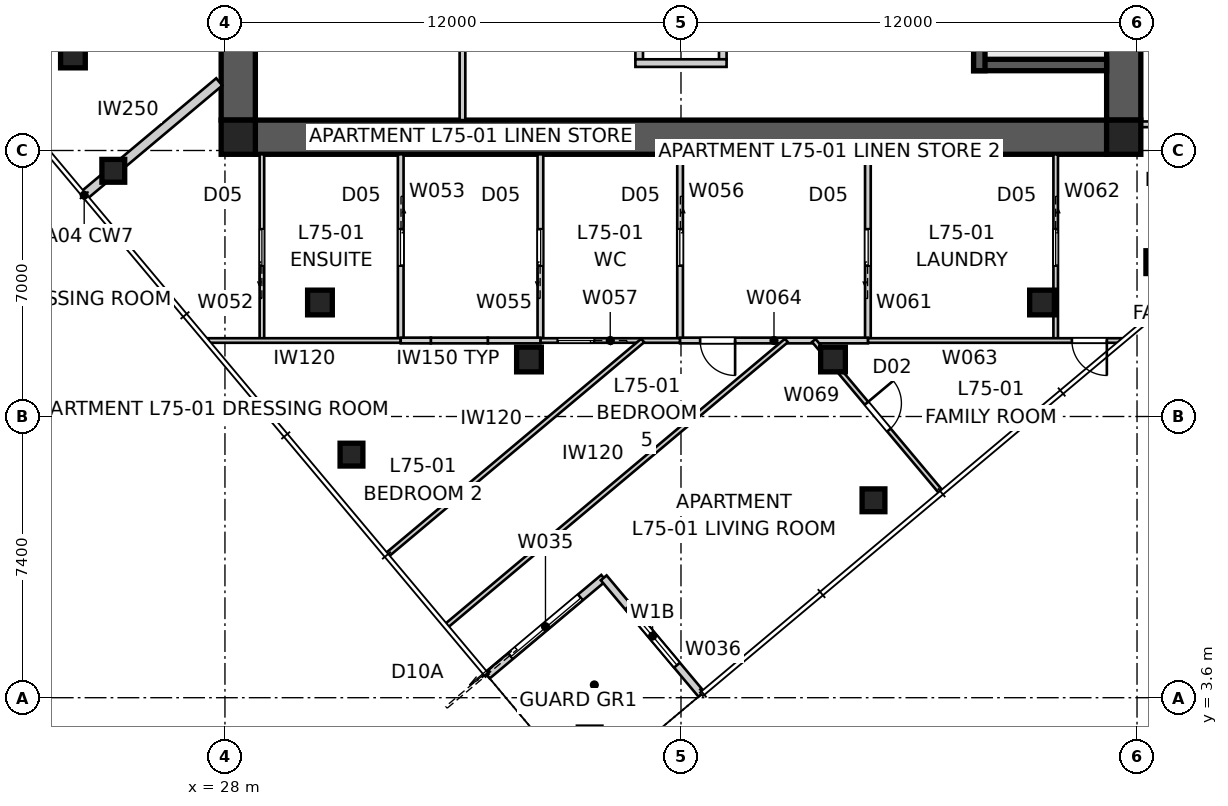
"""IFC4 building model, lengths in metres.
Left out: names, types, materials, properties, quantities, classifications, styles, units other than length and angle.
Written with IfcOpenShell. Run it as: python <this file> out.ifc"""

import sys

from ifc_helpers import new_model, si_unit, direction, frame, frame_2d, origin, origin_2d, place, context, subcontext, project, spatial, polyline, rectangle, outline, extrude, element, fill, save


model = new_model("IFC4")
c1 = context("Model", 3, precision=1e-05, world=origin(), true_north=direction((0.0, 1.0)))
c2 = subcontext(c1, "Body", "Model", "MODEL_VIEW")
j1 = project(units=[si_unit("LENGTHUNIT", "METRE"), si_unit("PLANEANGLEUNIT", "RADIAN")], contexts=[c1])
p1 = place(None, origin())
s1 = spatial("IfcSite", under=j1, at=p1, CompositionType="ELEMENT")
p2 = place(p1, origin())
s2 = spatial("IfcBuilding", under=s1, at=p2, CompositionType="ELEMENT")
p3 = place(p2, frame((0.0, 0.0, 272.6)))
s3 = spatial("IfcBuildingStorey", under=s2, at=p3, CompositionType="ELEMENT", Elevation=272.6)
p4 = place(p3, frame((51.2, 18.35, 0.0), z_axis=(0.0, 0.0, 1.0), x_axis=(-1.0, 0.0, 0.0)))
e1 = element("IfcWall", 1, at=p4, inside=s3, PredefinedType="SHEAR", context=c2, shape_type="SweptSolid", body=[
    extrude(outline(polyline([(0.0, -0.45), (22.4, -0.45), (22.4, -0.025), (22.85, -0.025), (22.85, 0.025), (22.4, 0.025), (22.4, 0.45), (0.0, 0.45), (0.0, 0.025), (-0.45, 0.025), (-0.45, -0.025), (0.0, -0.025), (0.0, -0.45)])), origin(), (0.0, 0.0, 1.0), 3.4),
])
p5 = place(p3, frame((51.65, 18.8, 0.0), z_axis=(0.0, 0.0, 1.0), x_axis=(0.0, 1.0, 0.0)))
e2 = element("IfcWall", 2, at=p5, inside=s3, PredefinedType="SHEAR", context=c2, shape_type="SweptSolid", body=[
    extrude(outline(polyline([(0.0, -0.45), (22.4, -0.45), (22.4, -0.025), (22.85, -0.025), (22.85, 0.025), (22.4, 0.025), (22.4, 0.45), (0.0, 0.45), (0.0, 0.025), (-0.45, 0.025), (-0.45, -0.025), (0.0, -0.025), (0.0, -0.45)])), origin(), (0.0, 0.0, 1.0), 3.4),
])
p6 = place(p5, frame((11.14, 0.0, 0.0)))
e3 = element("IfcOpeningElement", 3, at=p6, cuts=e2, PredefinedType="OPENING", context=c2, shape_type="SweptSolid", body=[
    extrude(rectangle(XDim=1.02, YDim=2.4, at=frame_2d((0.51, 1.2))), frame((0.0, 0.46, 0.0), z_axis=(0.0, -1.0, 0.0), x_axis=(1.0, 0.0, 0.0)), (0.0, 0.0, 1.0), 0.92),
])
p7 = place(p3, frame((28.35, 41.2, 0.0), z_axis=(0.0, 0.0, 1.0), x_axis=(0.0, -1.0, 0.0)))
e4 = element("IfcWall", 4, at=p7, inside=s3, PredefinedType="SHEAR", context=c2, shape_type="SweptSolid", body=[
    extrude(outline(polyline([(0.0, -0.45), (22.4, -0.45), (22.4, -0.025), (22.85, -0.025), (22.85, 0.025), (22.4, 0.025), (22.4, 0.45), (0.0, 0.45), (0.0, 0.025), (-0.45, 0.025), (-0.45, -0.025), (0.0, -0.025), (0.0, -0.45)])), origin(), (0.0, 0.0, 1.0), 3.4),
])
p8 = place(p7, frame((11.14, 0.0, 0.0)))
e5 = element("IfcOpeningElement", 5, at=p8, cuts=e4, PredefinedType="OPENING", context=c2, shape_type="SweptSolid", body=[
    extrude(rectangle(XDim=1.02, YDim=2.4, at=frame_2d((0.51, 1.2))), frame((0.0, 0.46, 0.0), z_axis=(0.0, -1.0, 0.0), x_axis=(1.0, 0.0, 0.0)), (0.0, 0.0, 1.0), 0.92),
])
p9 = place(p3, frame((47.85, 27.8, 0.0), z_axis=(0.0, 0.0, 1.0), x_axis=(0.0, -1.0, 0.0)))
e6 = element("IfcWall", 6, at=p9, inside=s3, PredefinedType="SHEAR", context=c2, shape_type="SweptSolid", body=[
    extrude(rectangle(XDim=7.7, YDim=0.3, at=frame_2d((3.85, 0.0))), origin(), (0.0, 0.0, 1.0), 3.4),
])
p10 = place(p3, frame((51.2, 20.25, 0.0), z_axis=(0.0, 0.0, 1.0), x_axis=(-1.0, 0.0, 0.0)))
e7 = element("IfcWall", 7, at=p10, inside=s3, PredefinedType="SHEAR", context=c2, shape_type="SweptSolid", body=[
    extrude(rectangle(XDim=3.5, YDim=0.3, at=frame_2d((1.75, 0.0))), origin(), (0.0, 0.0, 1.0), 3.4),
])
for number, where, z_axis, x_axis in (
    (8, (38.9, 22.4, 0.0), (0.0, 0.0, 1.0), (0.0, -1.0, 0.0)),
    (9, (41.1, 22.4, 0.0), (0.0, 0.0, 1.0), (0.0, -1.0, 0.0)),
):
    element("IfcWall", number, at=place(p3, frame(where, z_axis=z_axis, x_axis=x_axis)), inside=s3, PredefinedType="SOLIDWALL", context=c2, shape_type="SweptSolid", body=[
        extrude(rectangle(XDim=2.0, YDim=0.2, at=frame_2d((1.0, 0.0))), origin(), (0.0, 0.0, 1.0), 3.4),
    ])
p11 = place(p3, frame((38.8, 20.3, 0.0), z_axis=(0.0, 0.0, 1.0), x_axis=(1.0, 0.0, 0.0)))
e10 = element("IfcWall", 10, at=p11, inside=s3, PredefinedType="SOLIDWALL", context=c2, shape_type="SweptSolid", body=[
    extrude(rectangle(XDim=2.4, YDim=0.2, at=frame_2d((1.2, 0.0))), origin(), (0.0, 0.0, 1.0), 3.4),
])
for number, where, z_axis, x_axis in (
    (11, (28.35, 18.35, 0.0), (0.0, 0.0, 1.0), (1.0, 0.0, 0.0)),
    (12, (51.65, 18.35, 0.0), (0.0, 0.0, 1.0), (1.0, 0.0, 0.0)),
):
    element("IfcColumn", number, at=place(p3, frame(where, z_axis=z_axis, x_axis=x_axis)), inside=s3, PredefinedType="COLUMN", context=c2, shape_type="SweptSolid", body=[
        extrude(rectangle(XDim=0.9, YDim=0.9, at=origin_2d()), origin(), (0.0, 0.0, 1.0), 3.4),
    ])
for number, where, z_axis, x_axis in (
    (13, (45.065, 8.795, -0.15), (0.0, 0.0, 1.0), (1.0, 0.0, 0.0)),
    (14, (52.534, 15.062, -0.15), (0.0, 0.0, 1.0), (1.0, 0.0, 0.0)),
    (15, (25.062, 17.466, -0.15), (0.0, 0.0, 1.0), (1.0, 0.0, 0.0)),
    (16, (31.329, 9.997, -0.15), (0.0, 0.0, 1.0), (1.0, 0.0, 0.0)),
):
    element("IfcColumn", number, at=place(p3, frame(where, z_axis=z_axis, x_axis=x_axis)), inside=s3, PredefinedType="COLUMN", context=c2, shape_type="SweptSolid", body=[
        extrude(rectangle(XDim=0.6, YDim=0.6, at=origin_2d()), origin(), (0.0, 0.0, 1.0), 3.55),
    ])
for number, where, z_axis, x_axis in (
    (17, (24.0, 20.5, 0.0), (0.0, 0.0, 1.0), (1.0, 0.0, 0.0)),
    (18, (30.5, 14.0, 0.0), (0.0, 0.0, 1.0), (1.0, 0.0, 0.0)),
    (19, (36.0, 12.5, 0.0), (0.0, 0.0, 1.0), (1.0, 0.0, 0.0)),
    (20, (44.0, 12.5, 0.0), (0.0, 0.0, 1.0), (1.0, 0.0, 0.0)),
    (21, (49.5, 14.0, 0.0), (0.0, 0.0, 1.0), (1.0, 0.0, 0.0)),
):
    element("IfcColumn", number, at=place(p3, frame(where, z_axis=z_axis, x_axis=x_axis)), inside=s3, PredefinedType="COLUMN", context=c2, shape_type="SweptSolid", body=[
        extrude(rectangle(XDim=0.65, YDim=0.65, at=origin_2d()), origin(), (0.0, 0.0, 1.0), 3.4),
    ])
p12 = place(p3, frame((34.902, 4.183, 0.0), z_axis=(0.0, 0.0, 1.0), x_axis=(0.766060656284, 0.642768287094, 0.0)))
e22 = element("IfcWall", 22, at=p12, inside=s3, PredefinedType="SOLIDWALL", context=c2, shape_type="SweptSolid", body=[
    extrude(rectangle(XDim=4.0, YDim=0.2, at=frame_2d((2.0, 0.0))), origin(), (0.0, 0.0, 1.0), 3.25),
])
p13 = place(p12, frame((0.8, 0.0, 0.0)))
e23 = element("IfcOpeningElement", 23, at=p13, cuts=e22, PredefinedType="OPENING", context=c2, shape_type="SweptSolid", body=[
    extrude(rectangle(XDim=2.4, YDim=2.1, at=frame_2d((1.2, 1.05))), frame((0.0, 0.11, 0.0), z_axis=(0.0, -1.0, 0.0), x_axis=(1.0, 0.0, 0.0)), (0.0, 0.0, 1.0), 0.22),
])
p14 = place(p3, frame((37.966, 6.754, 0.0), z_axis=(0.0, 0.0, 1.0), x_axis=(0.642798342015, -0.766035437498, 0.0)))
e24 = element("IfcWall", 24, at=p14, inside=s3, PredefinedType="SOLIDWALL", context=c2, shape_type="SweptSolid", body=[
    extrude(rectangle(XDim=4.0, YDim=0.2, at=frame_2d((2.0, 0.0))), origin(), (0.0, 0.0, 1.0), 3.25),
])
p15 = place(p14, frame((1.0, 0.0, 0.45)))
e25 = element("IfcOpeningElement", 25, at=p15, cuts=e24, PredefinedType="OPENING", context=c2, shape_type="SweptSolid", body=[
    extrude(rectangle(XDim=2.0, YDim=1.8, at=frame_2d((1.0, 0.9))), frame((0.0, 0.11, 0.0), z_axis=(0.0, -1.0, 0.0), x_axis=(1.0, 0.0, 0.0)), (0.0, 0.0, 1.0), 0.22),
])
p16 = place(p3, frame((24.296, 16.823, 0.0), z_axis=(0.0, 0.0, 1.0), x_axis=(0.76603440109, 0.64279957712, 0.0)))
e26 = element("IfcWall", 26, at=p16, inside=s3, PredefinedType="PARTITIONING", context=c2, shape_type="SweptSolid", body=[
    extrude(rectangle(XDim=4.64, YDim=0.25, at=frame_2d((2.32, 0.0))), origin(), (0.0, 0.0, 1.0), 3.25),
])
p17 = place(p3, frame((34.25, 18.8, 0.0), z_axis=(0.0, 0.0, 1.0), x_axis=(0.0, 1.0, 0.0)))
e27 = element("IfcWall", 27, at=p17, inside=s3, PredefinedType="SOLIDWALL", context=c2, shape_type="SweptSolid", body=[
    extrude(rectangle(XDim=5.9, YDim=0.15, at=frame_2d((2.95, 0.0))), origin(), (0.0, 0.0, 1.0), 3.25),
])
p18 = place(p3, frame((28.972, 13.0, 0.0), z_axis=(0.0, 0.0, 1.0), x_axis=(0.0, 1.0, 0.0)))
e28 = element("IfcWall", 28, at=p18, inside=s3, PredefinedType="PARTITIONING", context=c2, shape_type="SweptSolid", body=[
    extrude(rectangle(XDim=4.9, YDim=0.12, at=frame_2d((2.45, 0.0))), origin(), (0.0, 0.0, 1.0), 3.25),
])
p19 = place(p18, frame((1.97, 0.0, 0.0)))
e29 = element("IfcOpeningElement", 29, at=p19, cuts=e28, PredefinedType="OPENING", context=c2, shape_type="SweptSolid", body=[
    extrude(rectangle(XDim=0.96, YDim=2.1, at=frame_2d((0.48, 1.05))), frame((0.0, 0.07, 0.0), z_axis=(0.0, -1.0, 0.0), x_axis=(1.0, 0.0, 0.0)), (0.0, 0.0, 1.0), 0.14),
])
p20 = place(p3, frame((32.625, 17.9, 0.0), z_axis=(0.0, 0.0, 1.0), x_axis=(0.0, -1.0, 0.0)))
e30 = element("IfcWall", 30, at=p20, inside=s3, PredefinedType="SOLIDWALL", context=c2, shape_type="SweptSolid", body=[
    extrude(rectangle(XDim=4.9, YDim=0.15, at=frame_2d((2.45, 0.0))), origin(), (0.0, 0.0, 1.0), 3.25),
])
p21 = place(p20, frame((1.97, 0.0, 0.0)))
e31 = element("IfcOpeningElement", 31, at=p21, cuts=e30, PredefinedType="OPENING", context=c2, shape_type="SweptSolid", body=[
    extrude(rectangle(XDim=0.96, YDim=2.1, at=frame_2d((0.48, 1.05))), frame((0.0, 0.085, 0.0), z_axis=(0.0, -1.0, 0.0), x_axis=(1.0, 0.0, 0.0)), (0.0, 0.0, 1.0), 0.17),
])
p22 = place(p3, frame((32.625, 13.0, 0.0), z_axis=(0.0, 0.0, 1.0), x_axis=(-1.0, 0.0, 0.0)))
e32 = element("IfcWall", 32, at=p22, inside=s3, PredefinedType="PARTITIONING", context=c2, shape_type="SweptSolid", body=[
    extrude(rectangle(XDim=5.069, YDim=0.12, at=frame_2d((2.534, 0.0))), origin(), (0.0, 0.0, 1.0), 3.25),
])
p23 = place(p3, frame((36.301, 13.0, 0.0), z_axis=(0.0, 0.0, 1.0), x_axis=(0.0, 1.0, 0.0)))
e33 = element("IfcWall", 33, at=p23, inside=s3, PredefinedType="SOLIDWALL", context=c2, shape_type="SweptSolid", body=[
    extrude(rectangle(XDim=4.9, YDim=0.15, at=frame_2d((2.45, 0.0))), origin(), (0.0, 0.0, 1.0), 3.25),
])
p24 = place(p23, frame((1.97, 0.0, 0.0)))
e34 = element("IfcOpeningElement", 34, at=p24, cuts=e33, PredefinedType="OPENING", context=c2, shape_type="SweptSolid", body=[
    extrude(rectangle(XDim=0.96, YDim=2.1, at=frame_2d((0.48, 1.05))), frame((0.0, 0.085, 0.0), z_axis=(0.0, -1.0, 0.0), x_axis=(1.0, 0.0, 0.0)), (0.0, 0.0, 1.0), 0.17),
])
p25 = place(p3, frame((39.976, 17.9, 0.0), z_axis=(0.0, 0.0, 1.0), x_axis=(0.0, -1.0, 0.0)))
e35 = element("IfcWall", 35, at=p25, inside=s3, PredefinedType="SOLIDWALL", context=c2, shape_type="SweptSolid", body=[
    extrude(rectangle(XDim=4.9, YDim=0.15, at=frame_2d((2.45, 0.0))), origin(), (0.0, 0.0, 1.0), 2.796),
])
p26 = place(p25, frame((1.97, 0.0, 0.0)))
e36 = element("IfcOpeningElement", 36, at=p26, cuts=e35, PredefinedType="OPENING", context=c2, shape_type="SweptSolid", body=[
    extrude(rectangle(XDim=0.96, YDim=2.1, at=frame_2d((0.48, 1.05))), frame((0.0, 0.085, 0.0), z_axis=(0.0, -1.0, 0.0), x_axis=(1.0, 0.0, 0.0)), (0.0, 0.0, 1.0), 0.17),
])
p27 = place(p3, frame((39.976, 13.0, 0.0), z_axis=(0.0, 0.0, 1.0), x_axis=(-1.0, 0.0, 0.0)))
e37 = element("IfcWall", 37, at=p27, inside=s3, PredefinedType="PARTITIONING", context=c2, shape_type="SweptSolid", body=[
    extrude(rectangle(XDim=3.676, YDim=0.12, at=frame_2d((1.838, 0.0))), origin(), (0.0, 0.0, 1.0), 3.25),
])
p28 = place(p27, frame((2.261, 0.0, 0.0)))
e38 = element("IfcOpeningElement", 38, at=p28, cuts=e37, PredefinedType="OPENING", context=c2, shape_type="SweptSolid", body=[
    extrude(rectangle(XDim=0.96, YDim=2.1, at=frame_2d((0.48, 1.05))), frame((0.0, 0.07, 0.0), z_axis=(0.0, -1.0, 0.0), x_axis=(1.0, 0.0, 0.0)), (0.0, 0.0, 1.0), 0.14),
])
p29 = place(p3, frame((36.301, 13.0, 0.0), z_axis=(0.0, 0.0, 1.0), x_axis=(-1.0, 0.0, 0.0)))
e39 = element("IfcWall", 39, at=p29, inside=s3, PredefinedType="SOLIDWALL", context=c2, shape_type="SweptSolid", body=[
    extrude(rectangle(XDim=1.384, YDim=0.15, at=frame_2d((0.692, 0.0))), origin(), (0.0, 0.0, 1.0), 3.25),
])
p30 = place(p3, frame((34.917, 13.0, 0.0), z_axis=(0.0, 0.0, 1.0), x_axis=(-1.0, 0.0, 0.0)))
e40 = element("IfcWall", 40, at=p30, inside=s3, PredefinedType="SOLIDWALL", context=c2, shape_type="SweptSolid", body=[
    extrude(rectangle(XDim=1.5, YDim=0.15, at=frame_2d((0.75, 0.0))), origin(), (0.0, 0.0, 1.0), 2.55),
])
p31 = place(p3, frame((33.417, 13.0, 0.0), z_axis=(0.0, 0.0, 1.0), x_axis=(-1.0, 0.0, 0.0)))
e41 = element("IfcWall", 41, at=p31, inside=s3, PredefinedType="SOLIDWALL", context=c2, shape_type="SweptSolid", body=[
    extrude(rectangle(XDim=0.792, YDim=0.15, at=frame_2d((0.396, 0.0))), origin(), (0.0, 0.0, 1.0), 3.25),
])
p32 = place(p3, frame((44.918, 13.0, 0.0), z_axis=(0.0, 0.0, 1.0), x_axis=(0.0, 1.0, 0.0)))
e42 = element("IfcWall", 42, at=p32, inside=s3, PredefinedType="SOLIDWALL", context=c2, shape_type="SweptSolid", body=[
    extrude(rectangle(XDim=4.9, YDim=0.15, at=frame_2d((2.45, 0.0))), origin(), (0.0, 0.0, 1.0), 3.25),
])
p33 = place(p32, frame((1.97, 0.0, 0.0)))
e43 = element("IfcOpeningElement", 43, at=p33, cuts=e42, PredefinedType="OPENING", context=c2, shape_type="SweptSolid", body=[
    extrude(rectangle(XDim=0.96, YDim=2.1, at=frame_2d((0.48, 1.05))), frame((0.0, 0.085, 0.0), z_axis=(0.0, -1.0, 0.0), x_axis=(1.0, 0.0, 0.0)), (0.0, 0.0, 1.0), 0.17),
])
p34 = place(p3, frame((49.86, 17.9, 0.0), z_axis=(0.0, 0.0, 1.0), x_axis=(0.0, -1.0, 0.0)))
e44 = element("IfcWall", 44, at=p34, inside=s3, PredefinedType="PARTITIONING", context=c2, shape_type="SweptSolid", body=[
    extrude(rectangle(XDim=4.9, YDim=0.12, at=frame_2d((2.45, 0.0))), origin(), (0.0, 0.0, 1.0), 3.25),
])
p35 = place(p34, frame((1.97, 0.0, 0.0)))
e45 = element("IfcOpeningElement", 45, at=p35, cuts=e44, PredefinedType="OPENING", context=c2, shape_type="SweptSolid", body=[
    extrude(rectangle(XDim=0.96, YDim=2.1, at=frame_2d((0.48, 1.05))), frame((0.0, 0.07, 0.0), z_axis=(0.0, -1.0, 0.0), x_axis=(1.0, 0.0, 0.0)), (0.0, 0.0, 1.0), 0.14),
])
p36 = place(p3, frame((51.57, 13.0, 0.0), z_axis=(0.0, 0.0, 1.0), x_axis=(-1.0, 0.0, 0.0)))
e46 = element("IfcWall", 46, at=p36, inside=s3, PredefinedType="PARTITIONING", context=c2, shape_type="SweptSolid", body=[
    extrude(rectangle(XDim=6.652, YDim=0.12, at=frame_2d((3.326, 0.0))), origin(), (0.0, 0.0, 1.0), 2.55),
])
p37 = place(p36, frame((0.364, 0.0, 0.0)))
e47 = element("IfcOpeningElement", 47, at=p37, cuts=e46, PredefinedType="OPENING", context=c2, shape_type="SweptSolid", body=[
    extrude(rectangle(XDim=0.92, YDim=2.1, at=frame_2d((0.46, 1.05))), frame((0.0, 0.07, 0.0), z_axis=(0.0, -1.0, 0.0), x_axis=(1.0, 0.0, 0.0)), (0.0, 0.0, 1.0), 0.14),
])
p38 = place(p3, frame((44.918, 13.0, 0.0), z_axis=(0.0, 0.0, 1.0), x_axis=(-1.0, 0.0, 0.0)))
e48 = element("IfcWall", 48, at=p38, inside=s3, PredefinedType="SOLIDWALL", context=c2, shape_type="SweptSolid", body=[
    extrude(rectangle(XDim=4.942, YDim=0.15, at=frame_2d((2.471, 0.0))), origin(), (0.0, 0.0, 1.0), 3.25),
])
p39 = place(p38, frame((3.494, 0.0, 0.0)))
e49 = element("IfcOpeningElement", 49, at=p39, cuts=e48, PredefinedType="OPENING", context=c2, shape_type="SweptSolid", body=[
    extrude(rectangle(XDim=0.92, YDim=2.34, at=frame_2d((0.46, 1.17))), frame((0.0, 0.085, 0.0), z_axis=(0.0, -1.0, 0.0), x_axis=(1.0, 0.0, 0.0)), (0.0, 0.0, 1.0), 0.17),
])
p40 = place(p3, frame((51.18, 18.689, 0.0), z_axis=(0.0, 0.0, 1.0), x_axis=(1.0, 0.0, 0.0)))
e50 = element("IfcWall", 50, at=p40, inside=s3, PredefinedType="SOLIDWALL", context=c2, shape_type="SweptSolid", body=[
    extrude(rectangle(XDim=5.82, YDim=0.15, at=frame_2d((2.91, 0.0))), origin(), (0.0, 0.0, 1.0), 3.25),
])
p41 = place(p40, frame((2.91, 0.0, 0.0)))
e51 = element("IfcOpeningElement", 51, at=p41, cuts=e50, PredefinedType="OPENING", context=c2, shape_type="SweptSolid", body=[
    extrude(rectangle(XDim=0.92, YDim=2.1, at=frame_2d((0.46, 1.05))), frame((0.0, 0.085, 0.0), z_axis=(0.0, -1.0, 0.0), x_axis=(1.0, 0.0, 0.0)), (0.0, 0.0, 1.0), 0.17),
])
p42 = place(p3, frame((33.844, 5.506, 0.0), z_axis=(0.0, 0.0, 1.0), x_axis=(0.766038517939, 0.642794670975, 0.0)))
e52 = element("IfcWall", 52, at=p42, inside=s3, PredefinedType="PARTITIONING", context=c2, shape_type="SweptSolid", body=[
    extrude(rectangle(XDim=11.658, YDim=0.12, at=frame_2d((5.829, 0.0))), origin(), (0.0, 0.0, 1.0), 3.25),
])
p43 = place(p3, frame((43.495, 13.0, 0.0), z_axis=(0.0, 0.0, 1.0), x_axis=(0.642776136034, -0.76605407051, 0.0)))
e53 = element("IfcWall", 53, at=p43, inside=s3, PredefinedType="PARTITIONING", context=c2, shape_type="SweptSolid", body=[
    extrude(rectangle(XDim=5.191, YDim=0.12, at=frame_2d((2.595, 0.0))), origin(), (0.0, 0.0, 1.0), 3.25),
])
p44 = place(p43, frame((2.155, 0.0, 0.0)))
e54 = element("IfcOpeningElement", 54, at=p44, cuts=e53, PredefinedType="OPENING", context=c2, shape_type="SweptSolid", body=[
    extrude(rectangle(XDim=0.92, YDim=2.34, at=frame_2d((0.46, 1.17))), frame((0.0, 0.07, 0.0), z_axis=(0.0, -1.0, 0.0), x_axis=(1.0, 0.0, 0.0)), (0.0, 0.0, 1.0), 0.14),
])
p45 = place(p3, frame((38.992, 13.0, 0.0), z_axis=(0.0, 0.0, 1.0), x_axis=(-0.766046785022, -0.642784818704, 0.0)))
e55 = element("IfcWall", 55, at=p45, inside=s3, PredefinedType="PARTITIONING", context=c2, shape_type="SweptSolid", body=[
    extrude(rectangle(XDim=8.76, YDim=0.12, at=frame_2d((4.38, 0.0))), origin(), (0.0, 0.0, 1.0), 3.25),
])
p46 = place(p13, origin())
e56 = element("IfcDoor", 56, at=p46, inside=s3, OperationType="SLIDING_TO_LEFT", PredefinedType="DOOR", context=c2, shape_type="SweptSolid", body=[
    extrude(rectangle(XDim=2.4, YDim=2.1, at=frame_2d((1.2, 1.05))), frame((0.0, 0.025, 0.0), z_axis=(0.0, -1.0, 0.0), x_axis=(1.0, 0.0, 0.0)), (0.0, 0.0, 1.0), 0.05),
])
fill(e23, e56)
p47 = place(p15, origin())
e57 = element("IfcWindow", 57, at=p47, inside=s3, PartitioningType="SINGLE_PANEL", PredefinedType="WINDOW", context=c2, shape_type="SweptSolid", body=[
    extrude(rectangle(XDim=2.0, YDim=1.8, at=frame_2d((1.0, 0.9))), frame((0.0, 0.03, 0.0), z_axis=(0.0, -1.0, 0.0), x_axis=(1.0, 0.0, 0.0)), (0.0, 0.0, 1.0), 0.06),
])
fill(e25, e57)
p48 = place(p35, origin())
e58 = element("IfcDoor", 58, at=p48, inside=s3, OperationType="SLIDING_TO_LEFT", PredefinedType="DOOR", context=c2, shape_type="SweptSolid", body=[
    extrude(rectangle(XDim=0.96, YDim=2.1, at=frame_2d((0.48, 1.05))), frame((0.0, 0.025, 0.0), z_axis=(0.0, -1.0, 0.0), x_axis=(1.0, 0.0, 0.0)), (0.0, 0.0, 1.0), 0.05),
])
fill(e45, e58)
p49 = place(p37, origin())
e59 = element("IfcDoor", 59, at=p49, inside=s3, OperationType="SINGLE_SWING_LEFT", PredefinedType="DOOR", context=c2, shape_type="SweptSolid", body=[
    extrude(rectangle(XDim=0.92, YDim=2.1, at=frame_2d((0.46, 1.05))), frame((0.0, 0.025, 0.0), z_axis=(0.0, -1.0, 0.0), x_axis=(1.0, 0.0, 0.0)), (0.0, 0.0, 1.0), 0.05),
])
fill(e47, e59)
p50 = place(p33, origin())
e60 = element("IfcDoor", 60, at=p50, inside=s3, OperationType="SLIDING_TO_LEFT", PredefinedType="DOOR", context=c2, shape_type="SweptSolid", body=[
    extrude(rectangle(XDim=0.96, YDim=2.1, at=frame_2d((0.48, 1.05))), frame((0.0, 0.025, 0.0), z_axis=(0.0, -1.0, 0.0), x_axis=(1.0, 0.0, 0.0)), (0.0, 0.0, 1.0), 0.05),
])
fill(e43, e60)
p51 = place(p44, origin())
e61 = element("IfcDoor", 61, at=p51, inside=s3, OperationType="SINGLE_SWING_LEFT", PredefinedType="DOOR", context=c2, shape_type="SweptSolid", body=[
    extrude(rectangle(XDim=0.92, YDim=2.34, at=frame_2d((0.46, 1.17))), frame((0.0, 0.025, 0.0), z_axis=(0.0, -1.0, 0.0), x_axis=(1.0, 0.0, 0.0)), (0.0, 0.0, 1.0), 0.05),
])
fill(e54, e61)
p52 = place(p26, origin())
e62 = element("IfcDoor", 62, at=p52, inside=s3, OperationType="SLIDING_TO_LEFT", PredefinedType="DOOR", context=c2, shape_type="SweptSolid", body=[
    extrude(rectangle(XDim=0.96, YDim=2.1, at=frame_2d((0.48, 1.05))), frame((0.0, 0.025, 0.0), z_axis=(0.0, -1.0, 0.0), x_axis=(1.0, 0.0, 0.0)), (0.0, 0.0, 1.0), 0.05),
])
fill(e36, e62)
p53 = place(p39, origin())
e63 = element("IfcDoor", 63, at=p53, inside=s3, OperationType="SINGLE_SWING_LEFT", PredefinedType="DOOR", context=c2, shape_type="SweptSolid", body=[
    extrude(rectangle(XDim=0.92, YDim=2.34, at=frame_2d((0.46, 1.17))), frame((0.0, 0.025, 0.0), z_axis=(0.0, -1.0, 0.0), x_axis=(1.0, 0.0, 0.0)), (0.0, 0.0, 1.0), 0.05),
])
fill(e49, e63)
p54 = place(p24, origin())
e64 = element("IfcDoor", 64, at=p54, inside=s3, OperationType="SLIDING_TO_LEFT", PredefinedType="DOOR", context=c2, shape_type="SweptSolid", body=[
    extrude(rectangle(XDim=0.96, YDim=2.1, at=frame_2d((0.48, 1.05))), frame((0.0, 0.025, 0.0), z_axis=(0.0, -1.0, 0.0), x_axis=(1.0, 0.0, 0.0)), (0.0, 0.0, 1.0), 0.05),
])
fill(e34, e64)
p55 = place(p28, origin())
e65 = element("IfcDoor", 65, at=p55, inside=s3, OperationType="SLIDING_TO_LEFT", PredefinedType="DOOR", context=c2, shape_type="SweptSolid", body=[
    extrude(rectangle(XDim=0.96, YDim=2.1, at=frame_2d((0.48, 1.05))), frame((0.0, 0.025, 0.0), z_axis=(0.0, -1.0, 0.0), x_axis=(1.0, 0.0, 0.0)), (0.0, 0.0, 1.0), 0.05),
])
fill(e38, e65)
p56 = place(p21, origin())
e66 = element("IfcDoor", 66, at=p56, inside=s3, OperationType="SLIDING_TO_LEFT", PredefinedType="DOOR", context=c2, shape_type="SweptSolid", body=[
    extrude(rectangle(XDim=0.96, YDim=2.1, at=frame_2d((0.48, 1.05))), frame((0.0, 0.025, 0.0), z_axis=(0.0, -1.0, 0.0), x_axis=(1.0, 0.0, 0.0)), (0.0, 0.0, 1.0), 0.05),
])
fill(e31, e66)
p57 = place(p19, origin())
e67 = element("IfcDoor", 67, at=p57, inside=s3, OperationType="SLIDING_TO_LEFT", PredefinedType="DOOR", context=c2, shape_type="SweptSolid", body=[
    extrude(rectangle(XDim=0.96, YDim=2.1, at=frame_2d((0.48, 1.05))), frame((0.0, 0.025, 0.0), z_axis=(0.0, -1.0, 0.0), x_axis=(1.0, 0.0, 0.0)), (0.0, 0.0, 1.0), 0.05),
])
fill(e29, e67)
save(model, sys.argv[1])
